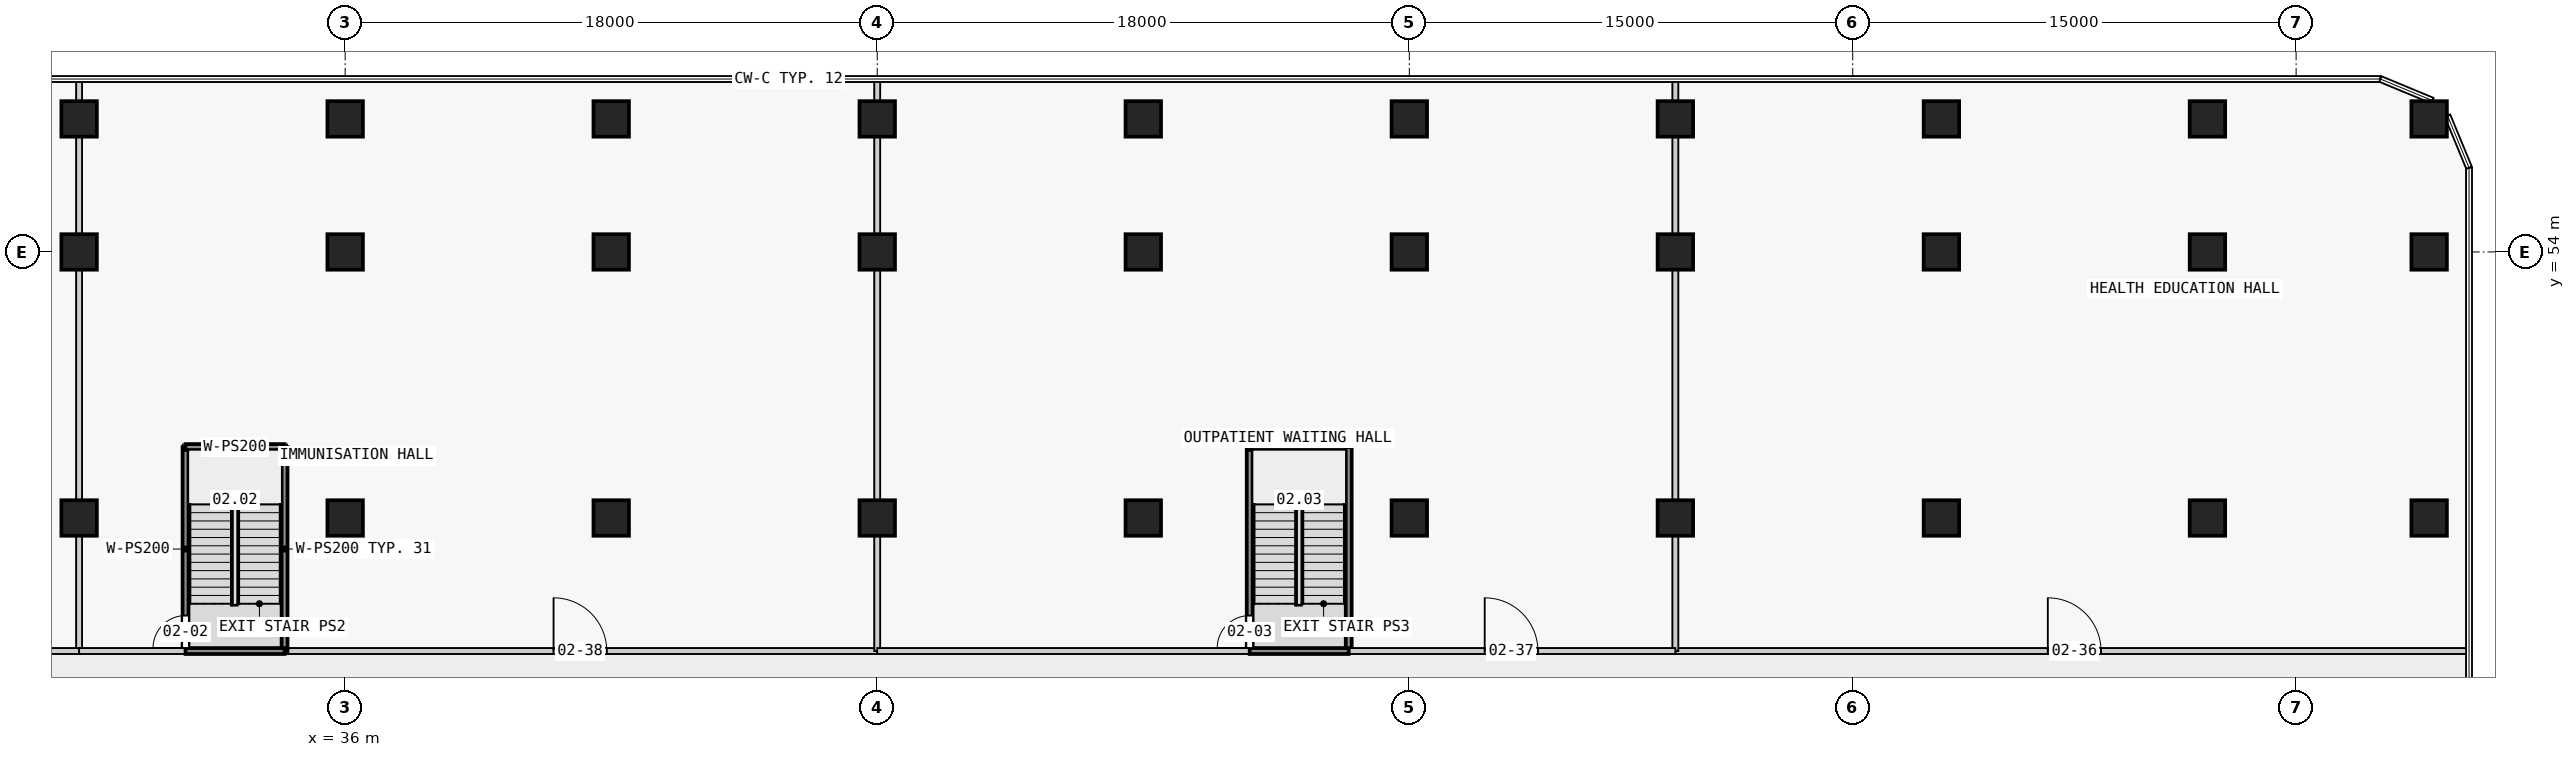
"""IFC4 building model, lengths in metres.
Left out: names, types, materials, properties, quantities, classifications, styles, units other than length and angle.
Written with IfcOpenShell. Run it as: python <this file> out.ifc"""

import sys

from ifc_helpers import new_model, si_unit, direction, frame, frame_2d, origin, origin_2d, place, context, subcontext, project, spatial, rectangle, extrude, element, fill, save


model = new_model("IFC4")
c1 = context("Model", 3, precision=1e-05, world=origin(), true_north=direction((0.0, 1.0)))
c2 = subcontext(c1, "Body", "Model", "MODEL_VIEW")
j1 = project(units=[si_unit("LENGTHUNIT", "METRE"), si_unit("PLANEANGLEUNIT", "RADIAN")], contexts=[c1])
p1 = place(None, origin())
s1 = spatial("IfcSite", under=j1, at=p1, CompositionType="ELEMENT")
p2 = place(p1, origin())
s2 = spatial("IfcBuilding", under=s1, at=p2, CompositionType="ELEMENT")
p3 = place(p2, frame((0.0, 0.0, 12.8)))
s3 = spatial("IfcBuildingStorey", under=s2, at=p3, CompositionType="ELEMENT", Elevation=12.8)
for number, where, z_axis, x_axis in (
    (1, (27.0, 45.0, 0.0), (0.0, 0.0, 1.0), (1.0, 0.0, 0.0)),
    (2, (27.0, 54.0, 0.0), (0.0, 0.0, 1.0), (1.0, 0.0, 0.0)),
    (3, (27.0, 58.5, 0.0), (0.0, 0.0, 1.0), (1.0, 0.0, 0.0)),
    (4, (36.0, 45.0, 0.0), (0.0, 0.0, 1.0), (1.0, 0.0, 0.0)),
    (5, (36.0, 54.0, 0.0), (0.0, 0.0, 1.0), (1.0, 0.0, 0.0)),
    (6, (36.0, 58.5, 0.0), (0.0, 0.0, 1.0), (1.0, 0.0, 0.0)),
    (7, (45.0, 45.0, 0.0), (0.0, 0.0, 1.0), (1.0, 0.0, 0.0)),
    (8, (45.0, 54.0, 0.0), (0.0, 0.0, 1.0), (1.0, 0.0, 0.0)),
    (9, (45.0, 58.5, 0.0), (0.0, 0.0, 1.0), (1.0, 0.0, 0.0)),
    (10, (54.0, 45.0, 0.0), (0.0, 0.0, 1.0), (1.0, 0.0, 0.0)),
    (11, (54.0, 54.0, 0.0), (0.0, 0.0, 1.0), (1.0, 0.0, 0.0)),
    (12, (54.0, 58.5, 0.0), (0.0, 0.0, 1.0), (1.0, 0.0, 0.0)),
    (13, (63.0, 45.0, 0.0), (0.0, 0.0, 1.0), (1.0, 0.0, 0.0)),
    (14, (63.0, 54.0, 0.0), (0.0, 0.0, 1.0), (1.0, 0.0, 0.0)),
    (15, (63.0, 58.5, 0.0), (0.0, 0.0, 1.0), (1.0, 0.0, 0.0)),
    (16, (72.0, 45.0, 0.0), (0.0, 0.0, 1.0), (1.0, 0.0, 0.0)),
    (17, (72.0, 54.0, 0.0), (0.0, 0.0, 1.0), (1.0, 0.0, 0.0)),
    (18, (72.0, 58.5, 0.0), (0.0, 0.0, 1.0), (1.0, 0.0, 0.0)),
    (19, (81.0, 45.0, 0.0), (0.0, 0.0, 1.0), (1.0, 0.0, 0.0)),
    (20, (81.0, 54.0, 0.0), (0.0, 0.0, 1.0), (1.0, 0.0, 0.0)),
    (21, (81.0, 58.5, 0.0), (0.0, 0.0, 1.0), (1.0, 0.0, 0.0)),
    (22, (90.0, 45.0, 0.0), (0.0, 0.0, 1.0), (1.0, 0.0, 0.0)),
    (23, (90.0, 54.0, 0.0), (0.0, 0.0, 1.0), (1.0, 0.0, 0.0)),
    (24, (90.0, 58.5, 0.0), (0.0, 0.0, 1.0), (1.0, 0.0, 0.0)),
    (25, (99.0, 45.0, 0.0), (0.0, 0.0, 1.0), (1.0, 0.0, 0.0)),
    (26, (99.0, 54.0, 0.0), (0.0, 0.0, 1.0), (1.0, 0.0, 0.0)),
    (27, (99.0, 58.5, 0.0), (0.0, 0.0, 1.0), (1.0, 0.0, 0.0)),
    (28, (106.5, 45.0, 0.0), (0.0, 0.0, 1.0), (1.0, 0.0, 0.0)),
    (29, (106.5, 54.0, 0.0), (0.0, 0.0, 1.0), (1.0, 0.0, 0.0)),
    (30, (106.5, 58.5, 0.0), (0.0, 0.0, 1.0), (1.0, 0.0, 0.0)),
):
    element("IfcColumn", number, at=place(p3, frame(where, z_axis=z_axis, x_axis=x_axis)), inside=s3, PredefinedType="COLUMN", context=c2, shape_type="SweptSolid", body=[
        extrude(rectangle(XDim=1.2, YDim=1.2, at=origin_2d()), origin(), (0.0, 0.0, 1.0), 4.5),
    ])
p4 = place(p3, frame((81.0, 40.5, 0.0), z_axis=(0.0, 0.0, 1.0), x_axis=(1.0, 0.0, 0.0)))
e31 = element("IfcWall", 31, at=p4, inside=s3, PredefinedType="PARTITIONING", context=c2, shape_type="SweptSolid", body=[
    extrude(rectangle(XDim=26.85, YDim=0.2, at=frame_2d((13.425, 0.0))), origin(), (0.0, 0.0, 1.0), 3.45),
])
p5 = place(p4, frame((12.6, 0.0, 0.0)))
e32 = element("IfcOpeningElement", 32, at=p5, cuts=e31, PredefinedType="OPENING", context=c2, shape_type="SweptSolid", body=[
    extrude(rectangle(XDim=1.8, YDim=2.1, at=frame_2d((0.9, 1.05))), frame((0.0, 0.11, 0.0), z_axis=(0.0, -1.0, 0.0), x_axis=(1.0, 0.0, 0.0)), (0.0, 0.0, 1.0), 0.22),
])
p6 = place(p3, frame((33.95, 40.5, 0.0), z_axis=(0.0, 0.0, 1.0), x_axis=(1.0, 0.0, 0.0)))
e33 = element("IfcWall", 33, at=p6, inside=s3, PredefinedType="PARTITIONING", context=c2, shape_type="SweptSolid", body=[
    extrude(rectangle(XDim=20.05, YDim=0.2, at=frame_2d((10.025, 0.0))), origin(), (0.0, 0.0, 1.0), 3.45),
])
p7 = place(p6, frame((9.1, 0.0, 0.0)))
e34 = element("IfcOpeningElement", 34, at=p7, cuts=e33, PredefinedType="OPENING", context=c2, shape_type="SweptSolid", body=[
    extrude(rectangle(XDim=1.8, YDim=2.1, at=frame_2d((0.9, 1.05))), frame((0.0, 0.11, 0.0), z_axis=(0.0, -1.0, 0.0), x_axis=(1.0, 0.0, 0.0)), (0.0, 0.0, 1.0), 0.22),
])
p8 = place(p3, frame((54.0, 59.85, 0.0), z_axis=(0.0, 0.0, 1.0), x_axis=(0.0, -1.0, 0.0)))
e35 = element("IfcWall", 35, at=p8, inside=s3, PredefinedType="PARTITIONING", context=c2, shape_type="SweptSolid", body=[
    extrude(rectangle(XDim=0.75, YDim=0.2, at=frame_2d((0.375, 0.0))), origin(), (0.0, 0.0, 1.0), 4.15),
])
p9 = place(p3, frame((54.0, 57.9, 0.0), z_axis=(0.0, 0.0, 1.0), x_axis=(0.0, -1.0, 0.0)))
e36 = element("IfcWall", 36, at=p9, inside=s3, PredefinedType="PARTITIONING", context=c2, shape_type="SweptSolid", body=[
    extrude(rectangle(XDim=3.3, YDim=0.2, at=frame_2d((1.65, 0.0))), origin(), (0.0, 0.0, 1.0), 3.45),
])
p10 = place(p3, frame((54.0, 53.4, 0.0), z_axis=(0.0, 0.0, 1.0), x_axis=(0.0, -1.0, 0.0)))
e37 = element("IfcWall", 37, at=p10, inside=s3, PredefinedType="PARTITIONING", context=c2, shape_type="SweptSolid", body=[
    extrude(rectangle(XDim=7.8, YDim=0.2, at=frame_2d((3.9, 0.0))), origin(), (0.0, 0.0, 1.0), 3.45),
])
p11 = place(p3, frame((54.0, 44.4, 0.0), z_axis=(0.0, 0.0, 1.0), x_axis=(0.0, -1.0, 0.0)))
e38 = element("IfcWall", 38, at=p11, inside=s3, PredefinedType="PARTITIONING", context=c2, shape_type="SweptSolid", body=[
    extrude(rectangle(XDim=3.9, YDim=0.2, at=frame_2d((1.95, 0.0))), origin(), (0.0, 0.0, 1.0), 3.45),
])
p12 = place(p3, frame((81.0, 59.85, 0.0), z_axis=(0.0, 0.0, 1.0), x_axis=(0.0, -1.0, 0.0)))
e39 = element("IfcWall", 39, at=p12, inside=s3, PredefinedType="PARTITIONING", context=c2, shape_type="SweptSolid", body=[
    extrude(rectangle(XDim=0.75, YDim=0.2, at=frame_2d((0.375, 0.0))), origin(), (0.0, 0.0, 1.0), 4.15),
])
p13 = place(p3, frame((81.0, 57.9, 0.0), z_axis=(0.0, 0.0, 1.0), x_axis=(0.0, -1.0, 0.0)))
e40 = element("IfcWall", 40, at=p13, inside=s3, PredefinedType="PARTITIONING", context=c2, shape_type="SweptSolid", body=[
    extrude(rectangle(XDim=3.3, YDim=0.2, at=frame_2d((1.65, 0.0))), origin(), (0.0, 0.0, 1.0), 3.45),
])
p14 = place(p3, frame((81.0, 53.4, 0.0), z_axis=(0.0, 0.0, 1.0), x_axis=(0.0, -1.0, 0.0)))
e41 = element("IfcWall", 41, at=p14, inside=s3, PredefinedType="PARTITIONING", context=c2, shape_type="SweptSolid", body=[
    extrude(rectangle(XDim=7.8, YDim=0.2, at=frame_2d((3.9, 0.0))), origin(), (0.0, 0.0, 1.0), 3.45),
])
p15 = place(p3, frame((81.0, 44.4, 0.0), z_axis=(0.0, 0.0, 1.0), x_axis=(0.0, -1.0, 0.0)))
e42 = element("IfcWall", 42, at=p15, inside=s3, PredefinedType="PARTITIONING", context=c2, shape_type="SweptSolid", body=[
    extrude(rectangle(XDim=3.9, YDim=0.2, at=frame_2d((1.95, 0.0))), origin(), (0.0, 0.0, 1.0), 3.45),
])
p16 = place(p3, frame((27.0, 59.85, 0.0), z_axis=(0.0, 0.0, 1.0), x_axis=(0.0, -1.0, 0.0)))
e43 = element("IfcWall", 43, at=p16, inside=s3, PredefinedType="PARTITIONING", context=c2, shape_type="SweptSolid", body=[
    extrude(rectangle(XDim=0.75, YDim=0.2, at=frame_2d((0.375, 0.0))), origin(), (0.0, 0.0, 1.0), 4.15),
])
p17 = place(p3, frame((27.0, 57.9, 0.0), z_axis=(0.0, 0.0, 1.0), x_axis=(0.0, -1.0, 0.0)))
e44 = element("IfcWall", 44, at=p17, inside=s3, PredefinedType="PARTITIONING", context=c2, shape_type="SweptSolid", body=[
    extrude(rectangle(XDim=3.3, YDim=0.2, at=frame_2d((1.65, 0.0))), origin(), (0.0, 0.0, 1.0), 3.45),
])
p18 = place(p3, frame((27.0, 53.4, 0.0), z_axis=(0.0, 0.0, 1.0), x_axis=(0.0, -1.0, 0.0)))
e45 = element("IfcWall", 45, at=p18, inside=s3, PredefinedType="PARTITIONING", context=c2, shape_type="SweptSolid", body=[
    extrude(rectangle(XDim=7.8, YDim=0.2, at=frame_2d((3.9, 0.0))), origin(), (0.0, 0.0, 1.0), 3.45),
])
p19 = place(p3, frame((27.0, 44.4, 0.0), z_axis=(0.0, 0.0, 1.0), x_axis=(0.0, -1.0, 0.0)))
e46 = element("IfcWall", 46, at=p19, inside=s3, PredefinedType="PARTITIONING", context=c2, shape_type="SweptSolid", body=[
    extrude(rectangle(XDim=3.9, YDim=0.2, at=frame_2d((1.95, 0.0))), origin(), (0.0, 0.0, 1.0), 3.45),
])
p20 = place(p3, frame((30.6, 40.5, 0.0), z_axis=(0.0, 0.0, 1.0), x_axis=(0.0, 1.0, 0.0)))
e47 = element("IfcWall", 47, at=p20, inside=s3, PredefinedType="PARTITIONING", context=c2, shape_type="SweptSolid", body=[
    extrude(rectangle(XDim=6.9, YDim=0.2, at=frame_2d((3.45, 0.0))), origin(), (0.0, 0.0, 1.0), 4.15),
])
p21 = place(p20, frame((0.1, 0.0, 0.0)))
e48 = element("IfcOpeningElement", 48, at=p21, cuts=e47, PredefinedType="OPENING", context=c2, shape_type="SweptSolid", body=[
    extrude(rectangle(XDim=1.1, YDim=2.1, at=frame_2d((0.55, 1.05))), frame((0.0, 0.11, 0.0), z_axis=(0.0, -1.0, 0.0), x_axis=(1.0, 0.0, 0.0)), (0.0, 0.0, 1.0), 0.22),
])
p22 = place(p3, frame((30.6, 47.4, 0.0), z_axis=(0.0, 0.0, 1.0), x_axis=(1.0, 0.0, 0.0)))
e49 = element("IfcWall", 49, at=p22, inside=s3, PredefinedType="PARTITIONING", context=c2, shape_type="SweptSolid", body=[
    extrude(rectangle(XDim=3.35, YDim=0.2, at=frame_2d((1.675, 0.0))), origin(), (0.0, 0.0, 1.0), 4.15),
])
p23 = place(p3, frame((33.95, 47.4, 0.0), z_axis=(0.0, 0.0, 1.0), x_axis=(0.0, -1.0, 0.0)))
e50 = element("IfcWall", 50, at=p23, inside=s3, PredefinedType="PARTITIONING", context=c2, shape_type="SweptSolid", body=[
    extrude(rectangle(XDim=6.9, YDim=0.2, at=frame_2d((3.45, 0.0))), origin(), (0.0, 0.0, 1.0), 4.15),
])
p24 = place(p3, frame((66.6, 40.5, 0.0), z_axis=(0.0, 0.0, 1.0), x_axis=(0.0, 1.0, 0.0)))
e51 = element("IfcWall", 51, at=p24, inside=s3, PredefinedType="PARTITIONING", context=c2, shape_type="SweptSolid", body=[
    extrude(rectangle(XDim=6.9, YDim=0.2, at=frame_2d((3.45, 0.0))), origin(), (0.0, 0.0, 1.0), 4.15),
])
p25 = place(p24, frame((0.1, 0.0, 0.0)))
e52 = element("IfcOpeningElement", 52, at=p25, cuts=e51, PredefinedType="OPENING", context=c2, shape_type="SweptSolid", body=[
    extrude(rectangle(XDim=1.1, YDim=2.1, at=frame_2d((0.55, 1.05))), frame((0.0, 0.11, 0.0), z_axis=(0.0, -1.0, 0.0), x_axis=(1.0, 0.0, 0.0)), (0.0, 0.0, 1.0), 0.22),
])
p26 = place(p3, frame((66.6, 47.4, 0.0), z_axis=(0.0, 0.0, 1.0), x_axis=(1.0, 0.0, 0.0)))
e53 = element("IfcWall", 53, at=p26, inside=s3, PredefinedType="PARTITIONING", context=c2, shape_type="SweptSolid", body=[
    extrude(rectangle(XDim=3.35, YDim=0.2, at=frame_2d((1.675, 0.0))), origin(), (0.0, 0.0, 1.0), 4.15),
])
p27 = place(p3, frame((69.95, 47.4, 0.0), z_axis=(0.0, 0.0, 1.0), x_axis=(0.0, -1.0, 0.0)))
e54 = element("IfcWall", 54, at=p27, inside=s3, PredefinedType="PARTITIONING", context=c2, shape_type="SweptSolid", body=[
    extrude(rectangle(XDim=6.9, YDim=0.2, at=frame_2d((3.45, 0.0))), origin(), (0.0, 0.0, 1.0), 4.15),
])
p28 = place(p3, frame((54.0, 40.5, 0.0), z_axis=(0.0, 0.0, 1.0), x_axis=(1.0, 0.0, 0.0)))
e55 = element("IfcWall", 55, at=p28, inside=s3, PredefinedType="PARTITIONING", context=c2, shape_type="SweptSolid", body=[
    extrude(rectangle(XDim=12.6, YDim=0.2, at=frame_2d((6.3, 0.0))), origin(), (0.0, 0.0, 1.0), 3.45),
])
p29 = place(p3, frame((69.95, 40.5, 0.0), z_axis=(0.0, 0.0, 1.0), x_axis=(1.0, 0.0, 0.0)))
e56 = element("IfcWall", 56, at=p29, inside=s3, PredefinedType="PARTITIONING", context=c2, shape_type="SweptSolid", body=[
    extrude(rectangle(XDim=11.05, YDim=0.2, at=frame_2d((5.525, 0.0))), origin(), (0.0, 0.0, 1.0), 3.45),
])
p30 = place(p29, frame((4.6, 0.0, 0.0)))
e57 = element("IfcOpeningElement", 57, at=p30, cuts=e56, PredefinedType="OPENING", context=c2, shape_type="SweptSolid", body=[
    extrude(rectangle(XDim=1.8, YDim=2.1, at=frame_2d((0.9, 1.05))), frame((0.0, 0.11, 0.0), z_axis=(0.0, -1.0, 0.0), x_axis=(1.0, 0.0, 0.0)), (0.0, 0.0, 1.0), 0.22),
])
p31 = place(p3, frame((16.15, 40.5, 0.0), z_axis=(0.0, 0.0, 1.0), x_axis=(1.0, 0.0, 0.0)))
e58 = element("IfcWall", 58, at=p31, inside=s3, PredefinedType="PARTITIONING", context=c2, shape_type="SweptSolid", body=[
    extrude(rectangle(XDim=10.85, YDim=0.2, at=frame_2d((5.425, 0.0))), origin(), (0.0, 0.0, 1.0), 3.45),
])
p32 = place(p3, frame((27.0, 40.5, 0.0), z_axis=(0.0, 0.0, 1.0), x_axis=(1.0, 0.0, 0.0)))
e59 = element("IfcWall", 59, at=p32, inside=s3, PredefinedType="PARTITIONING", context=c2, shape_type="SweptSolid", body=[
    extrude(rectangle(XDim=3.6, YDim=0.2, at=frame_2d((1.8, 0.0))), origin(), (0.0, 0.0, 1.0), 3.45),
])
for number, where, z_axis, x_axis in (
    (60, (33.95, 40.5, 0.0), (0.0, 0.0, 1.0), (-1.0, 0.0, 0.0)),
    (61, (69.95, 40.5, 0.0), (0.0, 0.0, 1.0), (-1.0, 0.0, 0.0)),
):
    element("IfcWall", number, at=place(p3, frame(where, z_axis=z_axis, x_axis=x_axis)), inside=s3, PredefinedType="PARTITIONING", context=c2, shape_type="SweptSolid", body=[
        extrude(rectangle(XDim=3.35, YDim=0.2, at=frame_2d((1.675, 0.0))), origin(), (0.0, 0.0, 1.0), 4.15),
    ])
p33 = place(p21, origin())
e62 = element("IfcDoor", 62, at=p33, inside=s3, OperationType="SINGLE_SWING_LEFT", PredefinedType="DOOR", context=c2, shape_type="SweptSolid", body=[
    extrude(rectangle(XDim=1.1, YDim=2.1, at=frame_2d((0.55, 1.05))), frame((0.0, 0.025, 0.0), z_axis=(0.0, -1.0, 0.0), x_axis=(1.0, 0.0, 0.0)), (0.0, 0.0, 1.0), 0.05),
])
fill(e48, e62)
p34 = place(p25, origin())
e63 = element("IfcDoor", 63, at=p34, inside=s3, OperationType="SINGLE_SWING_LEFT", PredefinedType="DOOR", context=c2, shape_type="SweptSolid", body=[
    extrude(rectangle(XDim=1.1, YDim=2.1, at=frame_2d((0.55, 1.05))), frame((0.0, 0.025, 0.0), z_axis=(0.0, -1.0, 0.0), x_axis=(1.0, 0.0, 0.0)), (0.0, 0.0, 1.0), 0.05),
])
fill(e52, e63)
p35 = place(p5, origin())
e64 = element("IfcDoor", 64, at=p35, inside=s3, OperationType="DOUBLE_DOOR_SINGLE_SWING", PredefinedType="DOOR", context=c2, shape_type="SweptSolid", body=[
    extrude(rectangle(XDim=1.8, YDim=2.1, at=frame_2d((0.9, 1.05))), frame((0.0, 0.025, 0.0), z_axis=(0.0, -1.0, 0.0), x_axis=(1.0, 0.0, 0.0)), (0.0, 0.0, 1.0), 0.05),
])
fill(e32, e64)
p36 = place(p30, origin())
e65 = element("IfcDoor", 65, at=p36, inside=s3, OperationType="DOUBLE_DOOR_SINGLE_SWING", PredefinedType="DOOR", context=c2, shape_type="SweptSolid", body=[
    extrude(rectangle(XDim=1.8, YDim=2.1, at=frame_2d((0.9, 1.05))), frame((0.0, 0.025, 0.0), z_axis=(0.0, -1.0, 0.0), x_axis=(1.0, 0.0, 0.0)), (0.0, 0.0, 1.0), 0.05),
])
fill(e57, e65)
p37 = place(p7, origin())
e66 = element("IfcDoor", 66, at=p37, inside=s3, OperationType="DOUBLE_DOOR_SINGLE_SWING", PredefinedType="DOOR", context=c2, shape_type="SweptSolid", body=[
    extrude(rectangle(XDim=1.8, YDim=2.1, at=frame_2d((0.9, 1.05))), frame((0.0, 0.025, 0.0), z_axis=(0.0, -1.0, 0.0), x_axis=(1.0, 0.0, 0.0)), (0.0, 0.0, 1.0), 0.05),
])
fill(e34, e66)
save(model, sys.argv[1])
